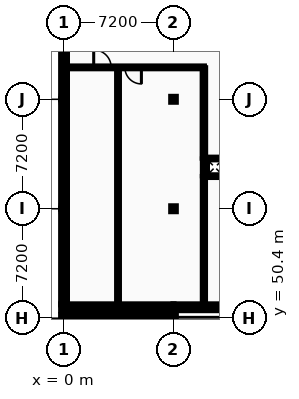
"""IFC4 building model, lengths in metres.
Left out: names, types, materials, properties, quantities, classifications, styles, units other than length and angle.
Written with IfcOpenShell. Run it as: python <this file> out.ifc"""

import sys

from ifc_helpers import new_model, si_unit, direction, frame, frame_2d, origin, origin_2d, place, context, subcontext, project, spatial, rectangle, i_section, extrude, element, fill, save


model = new_model("IFC4")
c1 = context("Model", 3, precision=1e-05, world=origin(), true_north=direction((0.0, 1.0)))
c2 = subcontext(c1, "Body", "Model", "MODEL_VIEW")
j1 = project(units=[si_unit("LENGTHUNIT", "METRE"), si_unit("PLANEANGLEUNIT", "RADIAN")], contexts=[c1])
p1 = place(None, origin())
s1 = spatial("IfcSite", under=j1, at=p1, CompositionType="ELEMENT")
p2 = place(p1, origin())
s2 = spatial("IfcBuilding", under=s1, at=p2, CompositionType="ELEMENT")
p3 = place(p2, frame((0.0, 0.0, 9.6)))
s3 = spatial("IfcBuildingStorey", under=s2, at=p3, CompositionType="ELEMENT", Elevation=9.6)
p4 = place(p3, frame((0.0, 50.4, 0.0), z_axis=(0.0, 0.0, 1.0), x_axis=(1.0, 0.0, 0.0)))
e1 = element("IfcColumn", 1, at=p4, inside=s3, PredefinedType="COLUMN", context=c2, shape_type="SweptSolid", body=[
    extrude(i_section(OverallWidth=0.3, OverallDepth=0.36, WebThickness=0.012, FlangeThickness=0.022, FilletRadius=0.027, at=origin_2d()), origin(), (0.0, 0.0, 1.0), 4.4),
])
p5 = place(p3, frame((0.0, 51.12, 0.0), z_axis=(0.0, 0.0, 1.0), x_axis=(1.0, 0.0, 0.0)))
e2 = element("IfcColumn", 2, at=p5, inside=s3, PredefinedType="COLUMN", context=c2, shape_type="SweptSolid", body=[
    extrude(i_section(OverallWidth=0.24, OverallDepth=0.24, WebThickness=0.01, FlangeThickness=0.017, FilletRadius=0.021, at=origin_2d()), origin(), (0.0, 0.0, 1.0), 4.4),
])
for number, where, z_axis, x_axis in (
    (3, (0.0, 57.6, 0.0), (0.0, 0.0, 1.0), (1.0, 0.0, 0.0)),
    (4, (0.0, 64.8, 0.0), (0.0, 0.0, 1.0), (1.0, 0.0, 0.0)),
):
    element("IfcColumn", number, at=place(p3, frame(where, z_axis=z_axis, x_axis=x_axis)), inside=s3, PredefinedType="COLUMN", context=c2, shape_type="SweptSolid", body=[
        extrude(i_section(OverallWidth=0.3, OverallDepth=0.32, WebThickness=0.011, FlangeThickness=0.021, FilletRadius=0.027, at=origin_2d()), origin(), (0.0, 0.0, 1.0), 4.4),
    ])
p6 = place(p3, frame((7.2, 50.4, 0.0), z_axis=(0.0, 0.0, 1.0), x_axis=(1.0, 0.0, 0.0)))
e5 = element("IfcColumn", 5, at=p6, inside=s3, PredefinedType="COLUMN", context=c2, shape_type="SweptSolid", body=[
    extrude(i_section(OverallWidth=0.3, OverallDepth=0.36, WebThickness=0.012, FlangeThickness=0.022, FilletRadius=0.027, at=origin_2d()), origin(), (0.0, 0.0, 1.0), 4.4),
])
p7 = place(p3, frame((7.2, 51.12, 0.0), z_axis=(0.0, 0.0, 1.0), x_axis=(1.0, 0.0, 0.0)))
e6 = element("IfcColumn", 6, at=p7, inside=s3, PredefinedType="COLUMN", context=c2, shape_type="SweptSolid", body=[
    extrude(i_section(OverallWidth=0.24, OverallDepth=0.24, WebThickness=0.01, FlangeThickness=0.017, FilletRadius=0.021, at=origin_2d()), origin(), (0.0, 0.0, 1.0), 4.4),
])
for number, where, z_axis, x_axis in (
    (7, (7.2, 57.6, 0.0), (0.0, 0.0, 1.0), (1.0, 0.0, 0.0)),
    (8, (7.2, 64.8, 0.0), (0.0, 0.0, 1.0), (1.0, 0.0, 0.0)),
):
    element("IfcColumn", number, at=place(p3, frame(where, z_axis=z_axis, x_axis=x_axis)), inside=s3, PredefinedType="COLUMN", context=c2, shape_type="SweptSolid", body=[
        extrude(i_section(OverallWidth=0.3, OverallDepth=0.32, WebThickness=0.011, FlangeThickness=0.021, FilletRadius=0.027, at=origin_2d()), origin(), (0.0, 0.0, 1.0), 4.4),
    ])
p8 = place(p3, frame((7.31, 50.4, 0.0), z_axis=(0.0, 0.0, 1.0), x_axis=(-1.0, 0.0, 0.0)))
e9 = element("IfcWall", 9, at=p8, inside=s3, PredefinedType="STANDARD", context=c2, shape_type="SweptSolid", body=[
    extrude(rectangle(XDim=7.5, YDim=0.38, at=frame_2d((3.75, 0.0))), origin(), (0.0, 0.0, 1.0), 3.895),
])
p9 = place(p8, frame((4.65, 0.0, 0.95)))
e10 = element("IfcOpeningElement", 10, at=p9, cuts=e9, PredefinedType="OPENING", context=c2, shape_type="SweptSolid", body=[
    extrude(rectangle(XDim=1.2, YDim=1.296, at=frame_2d((0.6, 0.648))), frame((0.0, 0.2, 0.0), z_axis=(0.0, -1.0, 0.0), x_axis=(1.0, 0.0, 0.0)), (0.0, 0.0, 1.0), 0.4),
])
p10 = place(p3, frame((-0.19, 51.12, 0.0), z_axis=(0.0, 0.0, 1.0), x_axis=(1.0, 0.0, 0.0)))
e11 = element("IfcWall", 11, at=p10, inside=s3, PredefinedType="STANDARD", context=c2, shape_type="SweptSolid", body=[
    extrude(rectangle(XDim=7.39, YDim=0.38, at=frame_2d((3.695, 0.0))), origin(), (0.0, 0.0, 1.0), 3.875),
])
p11 = place(p10, frame((1.668, 0.0, 0.95)))
e12 = element("IfcOpeningElement", 12, at=p11, cuts=e11, PredefinedType="OPENING", context=c2, shape_type="SweptSolid", body=[
    extrude(rectangle(XDim=1.098, YDim=1.26, at=frame_2d((0.549, 0.63))), frame((0.0, 0.2, 0.0), z_axis=(0.0, -1.0, 0.0), x_axis=(1.0, 0.0, 0.0)), (0.0, 0.0, 1.0), 0.4),
])
p12 = place(p10, frame((4.624, 0.0, 0.95)))
e13 = element("IfcOpeningElement", 13, at=p12, cuts=e11, PredefinedType="OPENING", context=c2, shape_type="SweptSolid", body=[
    extrude(rectangle(XDim=1.098, YDim=1.26, at=frame_2d((0.549, 0.63))), frame((0.0, 0.2, 0.0), z_axis=(0.0, -1.0, 0.0), x_axis=(1.0, 0.0, 0.0)), (0.0, 0.0, 1.0), 0.4),
])
p13 = place(p3, frame((7.2, 51.12, 0.0), z_axis=(0.0, 0.0, 1.0), x_axis=(1.0, 0.0, 0.0)))
e14 = element("IfcWall", 14, at=p13, inside=s3, PredefinedType="STANDARD", context=c2, shape_type="SweptSolid", body=[
    extrude(rectangle(XDim=7.2, YDim=0.38, at=frame_2d((3.6, 0.0))), origin(), (0.0, 0.0, 1.0), 3.875),
])
p14 = place(p13, frame((4.474, 0.0, 0.95)))
e15 = element("IfcOpeningElement", 15, at=p14, cuts=e14, PredefinedType="OPENING", context=c2, shape_type="SweptSolid", body=[
    extrude(rectangle(XDim=1.132, YDim=1.26, at=frame_2d((0.566, 0.63))), frame((0.0, 0.2, 0.0), z_axis=(0.0, -1.0, 0.0), x_axis=(1.0, 0.0, 0.0)), (0.0, 0.0, 1.0), 0.4),
])
p15 = place(p3, frame((0.0, 57.6, 0.0), z_axis=(0.0, 0.0, 1.0), x_axis=(0.0, -1.0, 0.0)))
e16 = element("IfcWall", 16, at=p15, inside=s3, PredefinedType="STANDARD", context=c2, shape_type="SweptSolid", body=[
    extrude(rectangle(XDim=6.29, YDim=0.38, at=frame_2d((3.145, 0.0))), origin(), (0.0, 0.0, 1.0), 3.865),
])
p16 = place(p15, frame((2.681, 0.0, 0.95)))
e17 = element("IfcOpeningElement", 17, at=p16, cuts=e16, PredefinedType="OPENING", context=c2, shape_type="SweptSolid", body=[
    extrude(rectangle(XDim=0.928, YDim=1.296, at=frame_2d((0.464, 0.648))), frame((0.0, 0.2, 0.0), z_axis=(0.0, -1.0, 0.0), x_axis=(1.0, 0.0, 0.0)), (0.0, 0.0, 1.0), 0.4),
])
p17 = place(p3, frame((0.0, 64.8, 0.0), z_axis=(0.0, 0.0, 1.0), x_axis=(0.0, -1.0, 0.0)))
e18 = element("IfcWall", 18, at=p17, inside=s3, PredefinedType="STANDARD", context=c2, shape_type="SweptSolid", body=[
    extrude(rectangle(XDim=7.2, YDim=0.38, at=frame_2d((3.6, 0.0))), origin(), (0.0, 0.0, 1.0), 3.885),
])
p18 = place(p17, frame((1.679, 0.0, 0.95)))
e19 = element("IfcOpeningElement", 19, at=p18, cuts=e18, PredefinedType="OPENING", context=c2, shape_type="SweptSolid", body=[
    extrude(rectangle(XDim=0.962, YDim=1.296, at=frame_2d((0.481, 0.648))), frame((0.0, 0.2, 0.0), z_axis=(0.0, -1.0, 0.0), x_axis=(1.0, 0.0, 0.0)), (0.0, 0.0, 1.0), 0.4),
])
p19 = place(p17, frame((4.559, 0.0, 0.95)))
e20 = element("IfcOpeningElement", 20, at=p19, cuts=e18, PredefinedType="OPENING", context=c2, shape_type="SweptSolid", body=[
    extrude(rectangle(XDim=0.962, YDim=1.296, at=frame_2d((0.481, 0.648))), frame((0.0, 0.2, 0.0), z_axis=(0.0, -1.0, 0.0), x_axis=(1.0, 0.0, 0.0)), (0.0, 0.0, 1.0), 0.4),
])
p20 = place(p3, frame((0.0, 72.0, 0.0), z_axis=(0.0, 0.0, 1.0), x_axis=(0.0, -1.0, 0.0)))
e21 = element("IfcWall", 21, at=p20, inside=s3, PredefinedType="STANDARD", context=c2, shape_type="SweptSolid", body=[
    extrude(rectangle(XDim=7.2, YDim=0.38, at=frame_2d((3.6, 0.0))), origin(), (0.0, 0.0, 1.0), 3.885),
])
for number, where, z_axis, x_axis in (
    (22, (9.29, 59.745, 0.0), (0.0, 0.0, 1.0), (1.0, 0.0, 0.0)),
    (23, (9.29, 60.905, 0.0), (0.0, 0.0, 1.0), (1.0, 0.0, 0.0)),
):
    element("IfcWall", number, at=place(p3, frame(where, z_axis=z_axis, x_axis=x_axis)), inside=s3, PredefinedType="PARTITIONING", context=c2, shape_type="SweptSolid", body=[
        extrude(rectangle(XDim=1.27, YDim=0.11, at=frame_2d((0.635, 0.0))), origin(), (0.0, 0.0, 1.0), 4.2),
    ])
p21 = place(p3, frame((9.345, 59.8, 0.0), z_axis=(0.0, 0.0, 1.0), x_axis=(0.0, 1.0, 0.0)))
e24 = element("IfcWall", 24, at=p21, inside=s3, PredefinedType="PARTITIONING", context=c2, shape_type="SweptSolid", body=[
    extrude(rectangle(XDim=1.05, YDim=0.11, at=frame_2d((0.525, 0.0))), origin(), (0.0, 0.0, 1.0), 4.2),
])
p22 = place(p3, frame((0.2, 66.9, 0.0), z_axis=(0.0, 0.0, 1.0), x_axis=(1.0, 0.0, 0.0)))
e25 = element("IfcWall", 25, at=p22, inside=s3, PredefinedType="PARTITIONING", context=c2, shape_type="SweptSolid", body=[
    extrude(rectangle(XDim=9.0, YDim=0.118, at=frame_2d((4.5, 0.0))), origin(), (0.0, 0.0, 1.0), 4.2),
])
p23 = place(p22, frame((1.75, 0.0, 0.0)))
e26 = element("IfcOpeningElement", 26, at=p23, cuts=e25, PredefinedType="OPENING", context=c2, shape_type="SweptSolid", body=[
    extrude(rectangle(XDim=1.15, YDim=2.15, at=frame_2d((0.575, 1.075))), frame((0.0, 0.069, 0.0), z_axis=(0.0, -1.0, 0.0), x_axis=(1.0, 0.0, 0.0)), (0.0, 0.0, 1.0), 0.138),
])
p24 = place(p22, frame((3.8, 0.0, 0.0)))
e27 = element("IfcOpeningElement", 27, at=p24, cuts=e25, PredefinedType="OPENING", context=c2, shape_type="SweptSolid", body=[
    extrude(rectangle(XDim=1.088, YDim=2.152, at=frame_2d((0.544, 1.076))), frame((0.0, 0.069, 0.0), z_axis=(0.0, -1.0, 0.0), x_axis=(1.0, 0.0, 0.0)), (0.0, 0.0, 1.0), 0.138),
])
p25 = place(p3, frame((3.55, 51.32, 0.0), z_axis=(0.0, 0.0, 1.0), x_axis=(0.0, 1.0, 0.0)))
e28 = element("IfcWall", 28, at=p25, inside=s3, PredefinedType="PARTITIONING", context=c2, shape_type="SweptSolid", body=[
    extrude(rectangle(XDim=15.521, YDim=0.118, at=frame_2d((7.76, 0.0))), origin(), (0.0, 0.0, 1.0), 4.2),
])
p26 = place(p3, frame((9.2, 51.32, 0.0), z_axis=(0.0, 0.0, 1.0), x_axis=(0.0, 1.0, 0.0)))
e29 = element("IfcWall", 29, at=p26, inside=s3, PredefinedType="PARTITIONING", context=c2, shape_type="SweptSolid", body=[
    extrude(rectangle(XDim=8.37, YDim=0.142, at=frame_2d((4.185, 0.0))), origin(), (0.0, 0.0, 1.0), 4.2),
])
p27 = place(p3, frame((9.2, 59.8, 0.0), z_axis=(0.0, 0.0, 1.0), x_axis=(0.0, 1.0, 0.0)))
e30 = element("IfcWall", 30, at=p27, inside=s3, PredefinedType="PARTITIONING", context=c2, shape_type="SweptSolid", body=[
    extrude(rectangle(XDim=1.05, YDim=0.135, at=frame_2d((0.525, 0.0))), origin(), (0.0, 0.0, 1.0), 4.2),
])
p28 = place(p3, frame((9.2, 60.96, 0.0), z_axis=(0.0, 0.0, 1.0), x_axis=(0.0, 1.0, 0.0)))
e31 = element("IfcWall", 31, at=p28, inside=s3, PredefinedType="PARTITIONING", context=c2, shape_type="SweptSolid", body=[
    extrude(rectangle(XDim=5.881, YDim=0.16, at=frame_2d((2.94, 0.0))), origin(), (0.0, 0.0, 1.0), 4.2),
])
p29 = place(p9, origin())
e32 = element("IfcWindow", 32, at=p29, inside=s3, PartitioningType="SINGLE_PANEL", PredefinedType="WINDOW", context=c2, shape_type="SweptSolid", body=[
    extrude(rectangle(XDim=1.2, YDim=1.296, at=frame_2d((0.6, 0.648))), frame((0.0, 0.03, 0.0), z_axis=(0.0, -1.0, 0.0), x_axis=(1.0, 0.0, 0.0)), (0.0, 0.0, 1.0), 0.06),
])
fill(e10, e32)
p30 = place(p11, origin())
e33 = element("IfcWindow", 33, at=p30, inside=s3, PartitioningType="SINGLE_PANEL", PredefinedType="WINDOW", context=c2, shape_type="SweptSolid", body=[
    extrude(rectangle(XDim=1.098, YDim=1.26, at=frame_2d((0.549, 0.63))), frame((0.0, 0.03, 0.0), z_axis=(0.0, -1.0, 0.0), x_axis=(1.0, 0.0, 0.0)), (0.0, 0.0, 1.0), 0.06),
])
fill(e12, e33)
p31 = place(p12, origin())
e34 = element("IfcWindow", 34, at=p31, inside=s3, PartitioningType="SINGLE_PANEL", PredefinedType="WINDOW", context=c2, shape_type="SweptSolid", body=[
    extrude(rectangle(XDim=1.098, YDim=1.26, at=frame_2d((0.549, 0.63))), frame((0.0, 0.03, 0.0), z_axis=(0.0, -1.0, 0.0), x_axis=(1.0, 0.0, 0.0)), (0.0, 0.0, 1.0), 0.06),
])
fill(e13, e34)
p32 = place(p16, origin())
e35 = element("IfcWindow", 35, at=p32, inside=s3, PartitioningType="SINGLE_PANEL", PredefinedType="WINDOW", context=c2, shape_type="SweptSolid", body=[
    extrude(rectangle(XDim=0.928, YDim=1.296, at=frame_2d((0.464, 0.648))), frame((0.0, 0.03, 0.0), z_axis=(0.0, -1.0, 0.0), x_axis=(1.0, 0.0, 0.0)), (0.0, 0.0, 1.0), 0.06),
])
fill(e17, e35)
p33 = place(p18, origin())
e36 = element("IfcWindow", 36, at=p33, inside=s3, PartitioningType="SINGLE_PANEL", PredefinedType="WINDOW", context=c2, shape_type="SweptSolid", body=[
    extrude(rectangle(XDim=0.962, YDim=1.296, at=frame_2d((0.481, 0.648))), frame((0.0, 0.03, 0.0), z_axis=(0.0, -1.0, 0.0), x_axis=(1.0, 0.0, 0.0)), (0.0, 0.0, 1.0), 0.06),
])
fill(e19, e36)
p34 = place(p19, origin())
e37 = element("IfcWindow", 37, at=p34, inside=s3, PartitioningType="SINGLE_PANEL", PredefinedType="WINDOW", context=c2, shape_type="SweptSolid", body=[
    extrude(rectangle(XDim=0.962, YDim=1.296, at=frame_2d((0.481, 0.648))), frame((0.0, 0.03, 0.0), z_axis=(0.0, -1.0, 0.0), x_axis=(1.0, 0.0, 0.0)), (0.0, 0.0, 1.0), 0.06),
])
fill(e20, e37)
p35 = place(p23, origin())
e38 = element("IfcDoor", 38, at=p35, inside=s3, OperationType="SINGLE_SWING_LEFT", PredefinedType="DOOR", context=c2, shape_type="SweptSolid", body=[
    extrude(rectangle(XDim=1.15, YDim=2.15, at=frame_2d((0.575, 1.075))), frame((0.0, 0.025, 0.0), z_axis=(0.0, -1.0, 0.0), x_axis=(1.0, 0.0, 0.0)), (0.0, 0.0, 1.0), 0.05),
])
fill(e26, e38)
p36 = place(p24, origin())
e39 = element("IfcDoor", 39, at=p36, inside=s3, OperationType="SINGLE_SWING_RIGHT", PredefinedType="DOOR", context=c2, shape_type="SweptSolid", body=[
    extrude(rectangle(XDim=1.088, YDim=2.152, at=frame_2d((0.544, 1.076))), frame((0.0, 0.025, 0.0), z_axis=(0.0, -1.0, 0.0), x_axis=(1.0, 0.0, 0.0)), (0.0, 0.0, 1.0), 0.05),
])
fill(e27, e39)
save(model, sys.argv[1])
